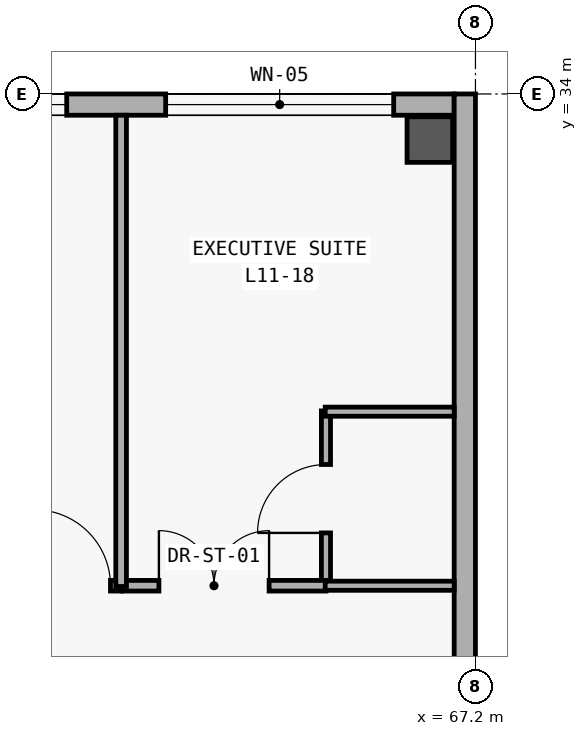
"""IFC4 building model, lengths in metres.
Left out: names, types, materials, properties, quantities, classifications, styles, units other than length and angle.
Written with IfcOpenShell. Run it as: python <this file> out.ifc"""

import sys

from ifc_helpers import new_model, si_unit, direction, frame, frame_2d, origin, origin_2d, place, context, subcontext, project, spatial, rectangle, extrude, element, fill, save


model = new_model("IFC4")
c1 = context("Model", 3, precision=1e-05, world=origin(), true_north=direction((0.0, 1.0)))
c2 = subcontext(c1, "Body", "Model", "MODEL_VIEW")
j1 = project(units=[si_unit("LENGTHUNIT", "METRE"), si_unit("PLANEANGLEUNIT", "RADIAN")], contexts=[c1])
p1 = place(None, origin())
s1 = spatial("IfcSite", under=j1, at=p1, CompositionType="ELEMENT")
p2 = place(p1, origin())
s2 = spatial("IfcBuilding", under=s1, at=p2, CompositionType="ELEMENT")
p3 = place(p2, frame((0.0, 0.0, 44.4)))
s3 = spatial("IfcBuildingStorey", under=s2, at=p3, CompositionType="ELEMENT", Elevation=44.4)
p4 = place(p3, frame((66.6, 33.4, 0.0), z_axis=(0.0, 0.0, 1.0), x_axis=(1.0, 0.0, 0.0)))
e1 = element("IfcColumn", 1, at=p4, inside=s3, PredefinedType="COLUMN", context=c2, shape_type="SweptSolid", body=[
    extrude(rectangle(XDim=0.6, YDim=0.6, at=origin_2d()), origin(), (0.0, 0.0, 1.0), 4.2),
])
p5 = place(p3, frame((17.08, 33.86, 0.0), z_axis=(0.0, 0.0, 1.0), x_axis=(1.0, 0.0, 0.0)))
e2 = element("IfcWall", 2, at=p5, inside=s3, PredefinedType="SOLIDWALL", context=c2, shape_type="SweptSolid", body=[
    extrude(rectangle(XDim=49.84, YDim=0.28, at=frame_2d((24.92, 0.0))), origin(), (0.0, 0.0, 1.0), 3.96),
])
p6 = place(p5, frame((5.295, 0.0, 0.85)))
e3 = element("IfcOpeningElement", 3, at=p6, cuts=e2, PredefinedType="OPENING", context=c2, shape_type="SweptSolid", body=[
    extrude(rectangle(XDim=1.8, YDim=1.6, at=frame_2d((0.9, 0.8))), frame((0.0, 0.15, 0.0), z_axis=(0.0, -1.0, 0.0), x_axis=(1.0, 0.0, 0.0)), (0.0, 0.0, 1.0), 0.3),
])
p7 = place(p5, frame((13.136, 0.0, 0.85)))
e4 = element("IfcOpeningElement", 4, at=p7, cuts=e2, PredefinedType="OPENING", context=c2, shape_type="SweptSolid", body=[
    extrude(rectangle(XDim=2.38, YDim=1.95, at=frame_2d((1.19, 0.975))), frame((0.0, 0.15, 0.0), z_axis=(0.0, -1.0, 0.0), x_axis=(1.0, 0.0, 0.0)), (0.0, 0.0, 1.0), 0.3),
])
p8 = place(p5, frame((17.238, 0.0, 0.85)))
e5 = element("IfcOpeningElement", 5, at=p8, cuts=e2, PredefinedType="OPENING", context=c2, shape_type="SweptSolid", body=[
    extrude(rectangle(XDim=2.48, YDim=2.0, at=frame_2d((1.24, 1.0))), frame((0.0, 0.15, 0.0), z_axis=(0.0, -1.0, 0.0), x_axis=(1.0, 0.0, 0.0)), (0.0, 0.0, 1.0), 0.3),
])
p9 = place(p5, frame((21.305, 0.0, 0.85)))
e6 = element("IfcOpeningElement", 6, at=p9, cuts=e2, PredefinedType="OPENING", context=c2, shape_type="SweptSolid", body=[
    extrude(rectangle(XDim=2.65, YDim=2.0, at=frame_2d((1.325, 1.0))), frame((0.0, 0.15, 0.0), z_axis=(0.0, -1.0, 0.0), x_axis=(1.0, 0.0, 0.0)), (0.0, 0.0, 1.0), 0.3),
])
p10 = place(p5, frame((25.308, 0.0, 0.85)))
e7 = element("IfcOpeningElement", 7, at=p10, cuts=e2, PredefinedType="OPENING", context=c2, shape_type="SweptSolid", body=[
    extrude(rectangle(XDim=2.95, YDim=2.05, at=frame_2d((1.475, 1.025))), frame((0.0, 0.15, 0.0), z_axis=(0.0, -1.0, 0.0), x_axis=(1.0, 0.0, 0.0)), (0.0, 0.0, 1.0), 0.3),
])
p11 = place(p5, frame((30.035, 0.0, 0.85)))
e8 = element("IfcOpeningElement", 8, at=p11, cuts=e2, PredefinedType="OPENING", context=c2, shape_type="SweptSolid", body=[
    extrude(rectangle(XDim=1.8, YDim=1.8, at=frame_2d((0.9, 0.9))), frame((0.0, 0.15, 0.0), z_axis=(0.0, -1.0, 0.0), x_axis=(1.0, 0.0, 0.0)), (0.0, 0.0, 1.0), 0.3),
])
p12 = place(p5, frame((34.037, 0.0, 0.85)))
e9 = element("IfcOpeningElement", 9, at=p12, cuts=e2, PredefinedType="OPENING", context=c2, shape_type="SweptSolid", body=[
    extrude(rectangle(XDim=2.1, YDim=1.8, at=frame_2d((1.05, 0.9))), frame((0.0, 0.15, 0.0), z_axis=(0.0, -1.0, 0.0), x_axis=(1.0, 0.0, 0.0)), (0.0, 0.0, 1.0), 0.3),
])
p13 = place(p5, frame((38.04, 0.0, 0.85)))
e10 = element("IfcOpeningElement", 10, at=p13, cuts=e2, PredefinedType="OPENING", context=c2, shape_type="SweptSolid", body=[
    extrude(rectangle(XDim=2.4, YDim=1.8, at=frame_2d((1.2, 0.9))), frame((0.0, 0.15, 0.0), z_axis=(0.0, -1.0, 0.0), x_axis=(1.0, 0.0, 0.0)), (0.0, 0.0, 1.0), 0.3),
])
p14 = place(p5, frame((42.042, 0.0, 0.85)))
e11 = element("IfcOpeningElement", 11, at=p14, cuts=e2, PredefinedType="OPENING", context=c2, shape_type="SweptSolid", body=[
    extrude(rectangle(XDim=2.7, YDim=1.85, at=frame_2d((1.35, 0.925))), frame((0.0, 0.15, 0.0), z_axis=(0.0, -1.0, 0.0), x_axis=(1.0, 0.0, 0.0)), (0.0, 0.0, 1.0), 0.3),
])
p15 = place(p5, frame((46.044, 0.0, 0.85)))
e12 = element("IfcOpeningElement", 12, at=p15, cuts=e2, PredefinedType="OPENING", context=c2, shape_type="SweptSolid", body=[
    extrude(rectangle(XDim=3.0, YDim=1.9, at=frame_2d((1.5, 0.95))), frame((0.0, 0.15, 0.0), z_axis=(0.0, -1.0, 0.0), x_axis=(1.0, 0.0, 0.0)), (0.0, 0.0, 1.0), 0.3),
])
p16 = place(p3, frame((67.06, 34.0, 0.0), z_axis=(0.0, 0.0, 1.0), x_axis=(0.0, -1.0, 0.0)))
e13 = element("IfcWall", 13, at=p16, inside=s3, PredefinedType="SOLIDWALL", context=c2, shape_type="SweptSolid", body=[
    extrude(rectangle(XDim=25.2, YDim=0.28, at=frame_2d((12.6, 0.0))), origin(), (0.0, 0.0, 1.0), 3.96),
])
p17 = place(p16, frame((21.9, 0.0, 0.95)))
e14 = element("IfcOpeningElement", 14, at=p17, cuts=e13, PredefinedType="OPENING", context=c2, shape_type="SweptSolid", body=[
    extrude(rectangle(XDim=1.6, YDim=1.6, at=frame_2d((0.8, 0.8))), frame((0.0, 0.15, 0.0), z_axis=(0.0, -1.0, 0.0), x_axis=(1.0, 0.0, 0.0)), (0.0, 0.0, 1.0), 0.3),
])
p18 = place(p3, frame((65.233, 27.52, 0.0), z_axis=(0.0, 0.0, 1.0), x_axis=(0.0, 1.0, 0.0)))
e15 = element("IfcWall", 15, at=p18, inside=s3, PredefinedType="PARTITIONING", context=c2, shape_type="SweptSolid", body=[
    extrude(rectangle(XDim=2.31, YDim=0.12, at=frame_2d((1.155, 0.0))), origin(), (0.0, 0.0, 1.0), 3.06),
])
p19 = place(p18, frame((0.705, 0.0, 0.0)))
e16 = element("IfcOpeningElement", 16, at=p19, cuts=e15, PredefinedType="OPENING", context=c2, shape_type="SweptSolid", body=[
    extrude(rectangle(XDim=0.9, YDim=2.18, at=frame_2d((0.45, 1.09))), frame((0.0, 0.07, 0.0), z_axis=(0.0, -1.0, 0.0), x_axis=(1.0, 0.0, 0.0)), (0.0, 0.0, 1.0), 0.14),
])
p20 = place(p3, frame((59.863, 27.53, 0.0), z_axis=(0.0, 0.0, 1.0), x_axis=(1.0, 0.0, 0.0)))
e17 = element("IfcWall", 17, at=p20, inside=s3, PredefinedType="PARTITIONING", context=c2, shape_type="SweptSolid", body=[
    extrude(rectangle(XDim=2.675, YDim=0.14, at=frame_2d((1.337, 0.0))), origin(), (0.0, 0.0, 1.0), 3.06),
])
p21 = place(p20, frame((1.535, 0.0, 0.0)))
e18 = element("IfcOpeningElement", 18, at=p21, cuts=e17, PredefinedType="OPENING", context=c2, shape_type="SweptSolid", body=[
    extrude(rectangle(XDim=1.0, YDim=2.28, at=frame_2d((0.5, 1.14))), frame((0.0, 0.08, 0.0), z_axis=(0.0, -1.0, 0.0), x_axis=(1.0, 0.0, 0.0)), (0.0, 0.0, 1.0), 0.16),
])
p22 = place(p3, frame((62.558, 27.53, 0.0), z_axis=(0.0, 0.0, 1.0), x_axis=(1.0, 0.0, 0.0)))
e19 = element("IfcWall", 19, at=p22, inside=s3, PredefinedType="PARTITIONING", context=c2, shape_type="SweptSolid", body=[
    extrude(rectangle(XDim=2.675, YDim=0.14, at=frame_2d((1.337, 0.0))), origin(), (0.0, 0.0, 1.0), 3.06),
])
p23 = place(p22, frame((0.477, 0.0, 0.0)))
e20 = element("IfcOpeningElement", 20, at=p23, cuts=e19, PredefinedType="OPENING", context=c2, shape_type="SweptSolid", body=[
    extrude(rectangle(XDim=1.45, YDim=2.3, at=frame_2d((0.725, 1.15))), frame((0.0, 0.08, 0.0), z_axis=(0.0, -1.0, 0.0), x_axis=(1.0, 0.0, 0.0)), (0.0, 0.0, 1.0), 0.16),
])
for number, where, z_axis, x_axis in (
    (21, (65.223, 27.53, 0.0), (0.0, 0.0, 1.0), (1.0, 0.0, 0.0)),
    (22, (65.223, 29.82, 0.0), (0.0, 0.0, 1.0), (1.0, 0.0, 0.0)),
):
    element("IfcWall", number, at=place(p3, frame(where, z_axis=z_axis, x_axis=x_axis)), inside=s3, PredefinedType="PARTITIONING", context=c2, shape_type="SweptSolid", body=[
        extrude(rectangle(XDim=1.697, YDim=0.12, at=frame_2d((0.849, 0.0))), origin(), (0.0, 0.0, 1.0), 3.06),
    ])
p24 = place(p3, frame((62.538, 27.52, 0.0), z_axis=(0.0, 0.0, 1.0), x_axis=(0.0, 1.0, 0.0)))
e23 = element("IfcWall", 23, at=p24, inside=s3, PredefinedType="PARTITIONING", context=c2, shape_type="SweptSolid", body=[
    extrude(rectangle(XDim=6.2, YDim=0.14, at=frame_2d((3.1, 0.0))), origin(), (0.0, 0.0, 1.0), 3.06),
])
p25 = place(p14, origin())
e24 = element("IfcWindow", 24, at=p25, inside=s3, PartitioningType="SINGLE_PANEL", PredefinedType="WINDOW", context=c2, shape_type="SweptSolid", body=[
    extrude(rectangle(XDim=2.7, YDim=1.85, at=frame_2d((1.35, 0.925))), frame((0.0, 0.03, 0.0), z_axis=(0.0, -1.0, 0.0), x_axis=(1.0, 0.0, 0.0)), (0.0, 0.0, 1.0), 0.06),
])
fill(e11, e24)
p26 = place(p15, origin())
e25 = element("IfcWindow", 25, at=p26, inside=s3, PartitioningType="SINGLE_PANEL", PredefinedType="WINDOW", context=c2, shape_type="SweptSolid", body=[
    extrude(rectangle(XDim=3.0, YDim=1.9, at=frame_2d((1.5, 0.95))), frame((0.0, 0.03, 0.0), z_axis=(0.0, -1.0, 0.0), x_axis=(1.0, 0.0, 0.0)), (0.0, 0.0, 1.0), 0.06),
])
fill(e12, e25)
p27 = place(p19, origin())
e26 = element("IfcDoor", 26, at=p27, inside=s3, OperationType="SINGLE_SWING_LEFT", PredefinedType="DOOR", context=c2, shape_type="SweptSolid", body=[
    extrude(rectangle(XDim=0.9, YDim=2.18, at=frame_2d((0.45, 1.09))), frame((0.0, 0.025, 0.0), z_axis=(0.0, -1.0, 0.0), x_axis=(1.0, 0.0, 0.0)), (0.0, 0.0, 1.0), 0.05),
])
fill(e16, e26)
p28 = place(p21, origin())
e27 = element("IfcDoor", 27, at=p28, inside=s3, OperationType="SINGLE_SWING_LEFT", PredefinedType="DOOR", context=c2, shape_type="SweptSolid", body=[
    extrude(rectangle(XDim=1.0, YDim=2.28, at=frame_2d((0.5, 1.14))), frame((0.0, 0.025, 0.0), z_axis=(0.0, -1.0, 0.0), x_axis=(1.0, 0.0, 0.0)), (0.0, 0.0, 1.0), 0.05),
])
fill(e18, e27)
p29 = place(p23, origin())
e28 = element("IfcDoor", 28, at=p29, inside=s3, OperationType="DOUBLE_DOOR_SINGLE_SWING", PredefinedType="DOOR", context=c2, shape_type="SweptSolid", body=[
    extrude(rectangle(XDim=1.45, YDim=2.3, at=frame_2d((0.725, 1.15))), frame((0.0, 0.025, 0.0), z_axis=(0.0, -1.0, 0.0), x_axis=(1.0, 0.0, 0.0)), (0.0, 0.0, 1.0), 0.05),
])
fill(e20, e28)
save(model, sys.argv[1])
